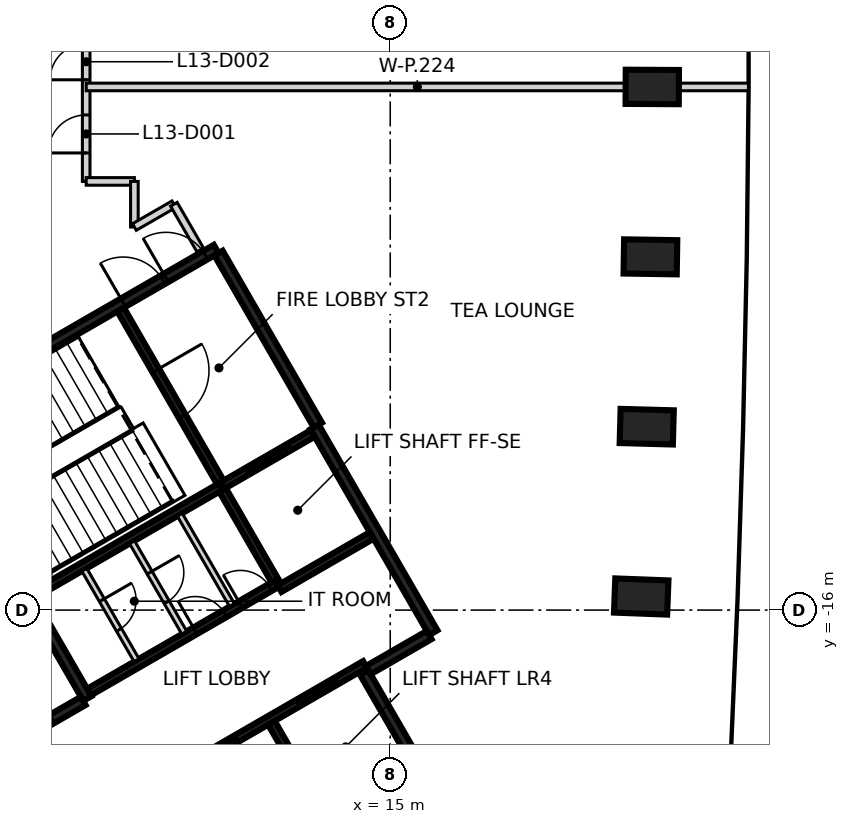
"""IFC4 building model, lengths in metres.
Left out: names, types, materials, properties, quantities, classifications, styles, units other than length and angle.
Written with IfcOpenShell. Run it as: python <this file> out.ifc"""

import sys

from ifc_helpers import new_model, si_unit, direction, frame, frame_2d, origin, origin_2d, place, context, subcontext, project, spatial, rectangle, extrude, element, fill, save


model = new_model("IFC4")
c1 = context("Model", 3, precision=1e-05, world=origin(), true_north=direction((0.0, 1.0)))
c2 = subcontext(c1, "Body", "Model", "MODEL_VIEW")
j1 = project(units=[si_unit("LENGTHUNIT", "METRE"), si_unit("PLANEANGLEUNIT", "RADIAN")], contexts=[c1])
p1 = place(None, origin())
s1 = spatial("IfcSite", under=j1, at=p1, CompositionType="ELEMENT")
p2 = place(p1, origin())
s2 = spatial("IfcBuilding", under=s1, at=p2, CompositionType="ELEMENT")
p3 = place(p2, frame((0.0, 0.0, 60.2)))
s3 = spatial("IfcBuildingStorey", under=s2, at=p3, CompositionType="ELEMENT", Elevation=60.2)
for number, where, z_axis, x_axis in (
    (1, (21.604, -15.643, -0.475), (0.0, 0.0, 1.0), (-0.999, 0.038, 0.0)),
    (2, (21.749, -11.174, -0.475), (0.0, 0.0, 1.0), (-1.0, 0.027, 0.0)),
    (3, (21.846, -6.706, -0.475), (0.0, 0.0, 1.0), (-1.0, 0.016, 0.0)),
    (4, (21.894, -2.235, -0.475), (0.0, 0.0, 1.0), (-1.0, 0.005, 0.0)),
):
    element("IfcColumn", number, at=place(p3, frame(where, z_axis=z_axis, x_axis=x_axis)), inside=s3, PredefinedType="COLUMN", context=c2, shape_type="SweptSolid", body=[
        extrude(rectangle(XDim=1.4, YDim=0.9, at=origin_2d()), origin(), (0.0, 0.0, 1.0), 3.6),
    ])
p4 = place(p3, frame((0.417, -12.273, 0.0), z_axis=(0.0, 0.0, 1.0), x_axis=(0.866021906294, 0.500006057782, 0.0)))
e5 = element("IfcWall", 5, at=p4, inside=s3, PredefinedType="SHEAR", context=c2, shape_type="SweptSolid", body=[
    extrude(rectangle(XDim=11.55, YDim=0.25, at=frame_2d((5.775, 0.0))), origin(), (0.0, 0.0, 1.0), 3.125),
])
p5 = place(p4, frame((10.025, 0.0, 0.0)))
e6 = element("IfcOpeningElement", 6, at=p5, cuts=e5, PredefinedType="OPENING", context=c2, shape_type="SweptSolid", body=[
    extrude(rectangle(XDim=1.2, YDim=2.1, at=frame_2d((0.6, 1.05))), frame((0.0, 0.135, 0.0), z_axis=(0.0, -1.0, 0.0), x_axis=(1.0, 0.0, 0.0)), (0.0, 0.0, 1.0), 0.27),
])
p6 = place(p4, frame((8.725, 0.0, 0.0)))
e7 = element("IfcOpeningElement", 7, at=p6, cuts=e5, PredefinedType="OPENING", context=c2, shape_type="SweptSolid", body=[
    extrude(rectangle(XDim=1.2, YDim=2.1, at=frame_2d((0.6, 1.05))), frame((0.0, 0.135, 0.0), z_axis=(0.0, -1.0, 0.0), x_axis=(1.0, 0.0, 0.0)), (0.0, 0.0, 1.0), 0.27),
])
p7 = place(p3, frame((13.008, -11.181, 0.0), z_axis=(0.0, 0.0, 1.0), x_axis=(0.500004234368, -0.866022959057, 0.0)))
e8 = element("IfcWall", 8, at=p7, inside=s3, PredefinedType="SHEAR", context=c2, shape_type="SweptSolid", body=[
    extrude(rectangle(XDim=6.25, YDim=0.25, at=frame_2d((3.125, 0.0))), origin(), (0.0, 0.0, 1.0), 3.125),
])
p8 = place(p3, frame((10.483, -6.606, 0.0), z_axis=(0.0, 0.0, 1.0), x_axis=(0.49999885962, -0.866026062182, 0.0)))
e9 = element("IfcWall", 9, at=p8, inside=s3, PredefinedType="SHEAR", context=c2, shape_type="SweptSolid", body=[
    extrude(rectangle(XDim=5.225, YDim=0.25, at=frame_2d((2.612, 0.0))), origin(), (0.0, 0.0, 1.0), 3.125),
])
p9 = place(p3, frame((7.031, -18.327, 0.0), z_axis=(0.0, 0.0, 1.0), x_axis=(-0.499971222258, 0.866042017984, 0.0)))
e10 = element("IfcWall", 10, at=p9, inside=s3, PredefinedType="SHEAR", context=c2, shape_type="SweptSolid", body=[
    extrude(rectangle(XDim=3.2, YDim=0.25, at=frame_2d((1.6, 0.0))), origin(), (0.0, 0.0, 1.0), 3.125),
])
p10 = place(p3, frame((14.315, -17.644, 0.0), z_axis=(0.0, 0.0, 1.0), x_axis=(0.500023226632, -0.866011993467, 0.0)))
e11 = element("IfcWall", 11, at=p10, inside=s3, PredefinedType="SHEAR", context=c2, shape_type="SweptSolid", body=[
    extrude(rectangle(XDim=2.974, YDim=0.25, at=frame_2d((1.487, 0.0))), origin(), (0.0, 0.0, 1.0), 3.125),
])
p11 = place(p3, frame((16.025, -16.656, 0.0), z_axis=(0.0, 0.0, 1.0), x_axis=(-0.866016279763, -0.500015802937, 0.0)))
e12 = element("IfcWall", 12, at=p11, inside=s3, PredefinedType="SHEAR", context=c2, shape_type="SweptSolid", body=[
    extrude(rectangle(XDim=1.849, YDim=0.25, at=frame_2d((0.925, 0.0))), origin(), (0.0, 0.0, 1.0), 3.125),
])
p12 = place(p3, frame((6.065, -18.885, 0.0), z_axis=(0.0, 0.0, 1.0), x_axis=(0.866017078145, 0.500014420154, 0.0)))
e13 = element("IfcWall", 13, at=p12, inside=s3, PredefinedType="SHEAR", context=c2, shape_type="SweptSolid", body=[
    extrude(rectangle(XDim=0.989, YDim=0.25, at=frame_2d((0.495, 0.0))), origin(), (0.0, 0.0, 1.0), 3.125),
])
p13 = place(p3, frame((6.08, -20.1, 0.0), z_axis=(0.0, 0.0, 1.0), x_axis=(-0.500051773299, 0.865995510393, 0.0)))
e14 = element("IfcWall", 14, at=p13, inside=s3, PredefinedType="SHEAR", context=c2, shape_type="SweptSolid", body=[
    extrude(rectangle(XDim=0.685, YDim=0.25, at=frame_2d((0.342, 0.0))), origin(), (0.0, 0.0, 1.0), 3.125),
])
p14 = place(p3, frame((9.052, -20.48, 0.0), z_axis=(0.0, 0.0, 1.0), x_axis=(0.866030299012, 0.499991521122, 0.0)))
e15 = element("IfcWall", 15, at=p14, inside=s3, PredefinedType="SHEAR", context=c2, shape_type="SweptSolid", body=[
    extrude(rectangle(XDim=6.1, YDim=0.2, at=frame_2d((3.05, 0.0))), origin(), (0.0, 0.0, 1.0), 3.125),
])
p15 = place(p14, frame((1.0, 0.0, 0.0)))
e16 = element("IfcOpeningElement", 16, at=p15, cuts=e15, PredefinedType="OPENING", context=c2, shape_type="SweptSolid", body=[
    extrude(rectangle(XDim=1.2, YDim=2.1, at=frame_2d((0.6, 1.05))), frame((0.0, 0.11, 0.0), z_axis=(0.0, -1.0, 0.0), x_axis=(1.0, 0.0, 0.0)), (0.0, 0.0, 1.0), 0.22),
])
p16 = place(p14, frame((4.05, 0.0, 0.0)))
e17 = element("IfcOpeningElement", 17, at=p16, cuts=e15, PredefinedType="OPENING", context=c2, shape_type="SweptSolid", body=[
    extrude(rectangle(XDim=1.2, YDim=2.1, at=frame_2d((0.6, 1.05))), frame((0.0, 0.11, 0.0), z_axis=(0.0, -1.0, 0.0), x_axis=(1.0, 0.0, 0.0)), (0.0, 0.0, 1.0), 0.22),
])
p17 = place(p3, frame((10.538, -12.752, 0.0), z_axis=(0.0, 0.0, 1.0), x_axis=(-0.866038630372, -0.499977090179, 0.0)))
e18 = element("IfcWall", 18, at=p17, inside=s3, PredefinedType="SHEAR", context=c2, shape_type="SweptSolid", body=[
    extrude(rectangle(XDim=5.699, YDim=0.2, at=frame_2d((2.85, 0.0))), origin(), (0.0, 0.0, 1.0), 3.125),
])
p18 = place(p3, frame((7.077, -18.156, 0.0), z_axis=(0.0, 0.0, 1.0), x_axis=(0.866038630372, 0.499977090179, 0.0)))
e19 = element("IfcWall", 19, at=p18, inside=s3, PredefinedType="SHEAR", context=c2, shape_type="SweptSolid", body=[
    extrude(rectangle(XDim=5.699, YDim=0.2, at=frame_2d((2.85, 0.0))), origin(), (0.0, 0.0, 1.0), 3.125),
])
p19 = place(p18, frame((3.224, 0.0, 0.0)))
e20 = element("IfcOpeningElement", 20, at=p19, cuts=e19, PredefinedType="OPENING", context=c2, shape_type="SweptSolid", body=[
    extrude(rectangle(XDim=0.9, YDim=2.1, at=frame_2d((0.45, 1.05))), frame((0.0, 0.11, 0.0), z_axis=(0.0, -1.0, 0.0), x_axis=(1.0, 0.0, 0.0)), (0.0, 0.0, 1.0), 0.22),
])
p20 = place(p18, frame((4.599, 0.0, 0.0)))
e21 = element("IfcOpeningElement", 21, at=p20, cuts=e19, PredefinedType="OPENING", context=c2, shape_type="SweptSolid", body=[
    extrude(rectangle(XDim=0.9, YDim=2.1, at=frame_2d((0.45, 1.05))), frame((0.0, 0.11, 0.0), z_axis=(0.0, -1.0, 0.0), x_axis=(1.0, 0.0, 0.0)), (0.0, 0.0, 1.0), 0.22),
])
p21 = place(p3, frame((7.906, -8.094, 0.0), z_axis=(0.0, 0.0, 1.0), x_axis=(0.500024287448, -0.866011380966, 0.0)))
e22 = element("IfcWall", 22, at=p21, inside=s3, PredefinedType="SHEAR", context=c2, shape_type="SweptSolid", body=[
    extrude(rectangle(XDim=5.251, YDim=0.2, at=frame_2d((2.625, 0.0))), origin(), (0.0, 0.0, 1.0), 3.125),
])
p22 = place(p21, frame((1.849, 0.0, 0.0)))
e23 = element("IfcOpeningElement", 23, at=p22, cuts=e22, PredefinedType="OPENING", context=c2, shape_type="SweptSolid", body=[
    extrude(rectangle(XDim=1.4, YDim=2.1, at=frame_2d((0.7, 1.05))), frame((0.0, 0.11, 0.0), z_axis=(0.0, -1.0, 0.0), x_axis=(1.0, 0.0, 0.0)), (0.0, 0.0, 1.0), 0.22),
])
p23 = place(p3, frame((11.875, -18.967, 0.0), z_axis=(0.0, 0.0, 1.0), x_axis=(0.49998131003, -0.866036194175, 0.0)))
e24 = element("IfcWall", 24, at=p23, inside=s3, PredefinedType="SHEAR", context=c2, shape_type="SweptSolid", body=[
    extrude(rectangle(XDim=3.048, YDim=0.2, at=frame_2d((1.524, 0.0))), origin(), (0.0, 0.0, 1.0), 3.125),
])
p24 = place(p3, frame((11.963, -15.22, 0.0), z_axis=(0.0, 0.0, 1.0), x_axis=(-0.500034990121, 0.866005201286, 0.0)))
e25 = element("IfcWall", 25, at=p24, inside=s3, PredefinedType="SHEAR", context=c2, shape_type="SweptSolid", body=[
    extrude(rectangle(XDim=2.75, YDim=0.2, at=frame_2d((1.375, 0.0))), origin(), (0.0, 0.0, 1.0), 3.125),
])
p25 = place(p3, frame((10.587, -12.723, 0.0), z_axis=(0.0, 0.0, 1.0), x_axis=(0.866037306777, 0.499979382845, 0.0)))
e26 = element("IfcWall", 26, at=p25, inside=s3, PredefinedType="SHEAR", context=c2, shape_type="SweptSolid", body=[
    extrude(rectangle(XDim=2.742, YDim=0.2, at=frame_2d((1.371, 0.0))), origin(), (0.0, 0.0, 1.0), 3.125),
])
p26 = place(p25, frame((0.743, 0.0, 0.0)))
e27 = element("IfcOpeningElement", 27, at=p26, cuts=e26, PredefinedType="OPENING", context=c2, shape_type="SweptSolid", body=[
    extrude(rectangle(XDim=1.3, YDim=2.1, at=frame_2d((0.65, 1.05))), frame((0.0, 0.11, 0.0), z_axis=(0.0, -1.0, 0.0), x_axis=(1.0, 0.0, 0.0)), (0.0, 0.0, 1.0), 0.22),
])
p27 = place(p3, frame((14.512, -14.037, 0.0), z_axis=(0.0, 0.0, 1.0), x_axis=(-0.866044696403, -0.499966582715, 0.0)))
e28 = element("IfcWall", 28, at=p27, inside=s3, PredefinedType="SHEAR", context=c2, shape_type="SweptSolid", body=[
    extrude(rectangle(XDim=2.799, YDim=0.2, at=frame_2d((1.399, 0.0))), origin(), (0.0, 0.0, 1.0), 3.125),
])
p28 = place(p3, frame((8.207, -14.214, 0.0), z_axis=(0.0, 0.0, 1.0), x_axis=(0.50002746344, -0.86600954718, 0.0)))
e29 = element("IfcWall", 29, at=p28, inside=s3, PredefinedType="PARTITIONING", context=c2, shape_type="SweptSolid", body=[
    extrude(rectangle(XDim=2.748, YDim=0.15, at=frame_2d((1.374, 0.0))), origin(), (0.0, 0.0, 1.0), 3.125),
])
p29 = place(p28, frame((0.924, 0.0, 0.0)))
e30 = element("IfcOpeningElement", 30, at=p29, cuts=e29, PredefinedType="OPENING", context=c2, shape_type="SweptSolid", body=[
    extrude(rectangle(XDim=0.9, YDim=2.1, at=frame_2d((0.45, 1.05))), frame((0.0, 0.085, 0.0), z_axis=(0.0, -1.0, 0.0), x_axis=(1.0, 0.0, 0.0)), (0.0, 0.0, 1.0), 0.17),
])
p30 = place(p3, frame((9.462, -13.489, 0.0), z_axis=(0.0, 0.0, 1.0), x_axis=(0.499988999718, -0.866031754707, 0.0)))
e31 = element("IfcWall", 31, at=p30, inside=s3, PredefinedType="PARTITIONING", context=c2, shape_type="SweptSolid", body=[
    extrude(rectangle(XDim=2.749, YDim=0.15, at=frame_2d((1.374, 0.0))), origin(), (0.0, 0.0, 1.0), 3.125),
])
p31 = place(p3, frame((6.951, -14.939, 0.0), z_axis=(0.0, 0.0, 1.0), x_axis=(0.499988999718, -0.866031754707, 0.0)))
e32 = element("IfcWall", 32, at=p31, inside=s3, PredefinedType="PARTITIONING", context=c2, shape_type="SweptSolid", body=[
    extrude(rectangle(XDim=2.749, YDim=0.15, at=frame_2d((1.374, 0.0))), origin(), (0.0, 0.0, 1.0), 3.125),
])
p32 = place(p31, frame((0.924, 0.0, 0.0)))
e33 = element("IfcOpeningElement", 33, at=p32, cuts=e32, PredefinedType="OPENING", context=c2, shape_type="SweptSolid", body=[
    extrude(rectangle(XDim=0.9, YDim=2.1, at=frame_2d((0.45, 1.05))), frame((0.0, 0.085, 0.0), z_axis=(0.0, -1.0, 0.0), x_axis=(1.0, 0.0, 0.0)), (0.0, 0.0, 1.0), 0.17),
])
p33 = place(p3, frame((7.0, -4.721, 0.0), z_axis=(0.0, 0.0, 1.0), x_axis=(0.0, 1.0, 0.0)))
e34 = element("IfcWall", 34, at=p33, inside=s3, PredefinedType="PARTITIONING", context=c2, shape_type="SweptSolid", body=[
    extrude(rectangle(XDim=8.799, YDim=0.2, at=frame_2d((4.399, 0.0))), origin(), (0.0, 0.0, 1.0), 3.125),
])
p34 = place(p33, frame((0.749, 0.0, 0.0)))
e35 = element("IfcOpeningElement", 35, at=p34, cuts=e34, PredefinedType="OPENING", context=c2, shape_type="SweptSolid", body=[
    extrude(rectangle(XDim=1.0, YDim=2.1, at=frame_2d((0.5, 1.05))), frame((0.0, 0.11, 0.0), z_axis=(0.0, -1.0, 0.0), x_axis=(1.0, 0.0, 0.0)), (0.0, 0.0, 1.0), 0.22),
])
p35 = place(p33, frame((2.674, 0.0, 0.0)))
e36 = element("IfcOpeningElement", 36, at=p35, cuts=e34, PredefinedType="OPENING", context=c2, shape_type="SweptSolid", body=[
    extrude(rectangle(XDim=0.95, YDim=2.1, at=frame_2d((0.475, 1.05))), frame((0.0, 0.11, 0.0), z_axis=(0.0, -1.0, 0.0), x_axis=(1.0, 0.0, 0.0)), (0.0, 0.0, 1.0), 0.22),
])
p36 = place(p3, frame((7.0, -4.721, 0.0), z_axis=(0.0, 0.0, 1.0), x_axis=(1.0, 0.0, 0.0)))
e37 = element("IfcWall", 37, at=p36, inside=s3, PredefinedType="PARTITIONING", context=c2, shape_type="SweptSolid", body=[
    extrude(rectangle(XDim=1.268, YDim=0.2, at=frame_2d((0.634, 0.0))), origin(), (0.0, 0.0, 1.0), 3.125),
])
p37 = place(p3, frame((8.268, -5.921, 0.0), z_axis=(0.0, 0.0, 1.0), x_axis=(0.0, 1.0, 0.0)))
e38 = element("IfcWall", 38, at=p37, inside=s3, PredefinedType="PARTITIONING", context=c2, shape_type="SweptSolid", body=[
    extrude(rectangle(XDim=1.2, YDim=0.2, at=frame_2d((0.6, 0.0))), origin(), (0.0, 0.0, 1.0), 3.125),
])
p38 = place(p3, frame((8.268, -5.921, 0.0), z_axis=(0.0, 0.0, 1.0), x_axis=(0.866344856625, 0.499446282797, 0.0)))
e39 = element("IfcWall", 39, at=p38, inside=s3, PredefinedType="PARTITIONING", context=c2, shape_type="SweptSolid", body=[
    extrude(rectangle(XDim=1.199, YDim=0.2, at=frame_2d((0.6, 0.0))), origin(), (0.0, 0.0, 1.0), 3.125),
])
p39 = place(p3, frame((9.307, -5.322, 0.0), z_axis=(0.0, 0.0, 1.0), x_axis=(0.500295157811, -0.865854927266, 0.0)))
e40 = element("IfcWall", 40, at=p39, inside=s3, PredefinedType="PARTITIONING", context=c2, shape_type="SweptSolid", body=[
    extrude(rectangle(XDim=1.39, YDim=0.2, at=frame_2d((0.695, 0.0))), origin(), (0.0, 0.0, 1.0), 3.125),
])
p40 = place(p3, frame((7.001, -2.235, 0.0), z_axis=(0.0, 0.0, 1.0), x_axis=(1.0, 0.0, 0.0)))
e41 = element("IfcWall", 41, at=p40, inside=s3, PredefinedType="PARTITIONING", context=c2, shape_type="SweptSolid", body=[
    extrude(rectangle(XDim=17.424, YDim=0.2, at=frame_2d((8.712, 0.0))), origin(), (0.0, 0.0, 1.0), 3.125),
])
p41 = place(p26, origin())
e42 = element("IfcDoor", 42, at=p41, inside=s3, OperationType="SLIDING_TO_RIGHT", PredefinedType="DOOR", context=c2, shape_type="SweptSolid", body=[
    extrude(rectangle(XDim=1.3, YDim=2.1, at=frame_2d((0.65, 1.05))), frame((0.0, 0.025, 0.0), z_axis=(0.0, -1.0, 0.0), x_axis=(1.0, 0.0, 0.0)), (0.0, 0.0, 1.0), 0.05),
])
fill(e27, e42)
p42 = place(p15, origin())
e43 = element("IfcDoor", 43, at=p42, inside=s3, OperationType="DOUBLE_DOOR_SLIDING", PredefinedType="DOOR", context=c2, shape_type="SweptSolid", body=[
    extrude(rectangle(XDim=1.2, YDim=2.1, at=frame_2d((0.6, 1.05))), frame((0.0, 0.025, 0.0), z_axis=(0.0, -1.0, 0.0), x_axis=(1.0, 0.0, 0.0)), (0.0, 0.0, 1.0), 0.05),
])
fill(e16, e43)
p43 = place(p16, origin())
e44 = element("IfcDoor", 44, at=p43, inside=s3, OperationType="DOUBLE_DOOR_SLIDING", PredefinedType="DOOR", context=c2, shape_type="SweptSolid", body=[
    extrude(rectangle(XDim=1.2, YDim=2.1, at=frame_2d((0.6, 1.05))), frame((0.0, 0.025, 0.0), z_axis=(0.0, -1.0, 0.0), x_axis=(1.0, 0.0, 0.0)), (0.0, 0.0, 1.0), 0.05),
])
fill(e17, e44)
p44 = place(p5, origin())
e45 = element("IfcDoor", 45, at=p44, inside=s3, OperationType="SINGLE_SWING_LEFT", PredefinedType="DOOR", context=c2, shape_type="SweptSolid", body=[
    extrude(rectangle(XDim=1.2, YDim=2.1, at=frame_2d((0.6, 1.05))), frame((0.0, 0.025, 0.0), z_axis=(0.0, -1.0, 0.0), x_axis=(1.0, 0.0, 0.0)), (0.0, 0.0, 1.0), 0.05),
])
fill(e6, e45)
p45 = place(p6, origin())
e46 = element("IfcDoor", 46, at=p45, inside=s3, OperationType="SINGLE_SWING_RIGHT", PredefinedType="DOOR", context=c2, shape_type="SweptSolid", body=[
    extrude(rectangle(XDim=1.2, YDim=2.1, at=frame_2d((0.6, 1.05))), frame((0.0, 0.025, 0.0), z_axis=(0.0, -1.0, 0.0), x_axis=(1.0, 0.0, 0.0)), (0.0, 0.0, 1.0), 0.05),
])
fill(e7, e46)
p46 = place(p22, origin())
e47 = element("IfcDoor", 47, at=p46, inside=s3, OperationType="SINGLE_SWING_RIGHT", PredefinedType="DOOR", context=c2, shape_type="SweptSolid", body=[
    extrude(rectangle(XDim=1.4, YDim=2.1, at=frame_2d((0.7, 1.05))), frame((0.0, 0.025, 0.0), z_axis=(0.0, -1.0, 0.0), x_axis=(1.0, 0.0, 0.0)), (0.0, 0.0, 1.0), 0.05),
])
fill(e23, e47)
p47 = place(p19, origin())
e48 = element("IfcDoor", 48, at=p47, inside=s3, OperationType="SINGLE_SWING_LEFT", PredefinedType="DOOR", context=c2, shape_type="SweptSolid", body=[
    extrude(rectangle(XDim=0.9, YDim=2.1, at=frame_2d((0.45, 1.05))), frame((0.0, 0.025, 0.0), z_axis=(0.0, -1.0, 0.0), x_axis=(1.0, 0.0, 0.0)), (0.0, 0.0, 1.0), 0.05),
])
fill(e20, e48)
p48 = place(p20, origin())
e49 = element("IfcDoor", 49, at=p48, inside=s3, OperationType="SINGLE_SWING_RIGHT", PredefinedType="DOOR", context=c2, shape_type="SweptSolid", body=[
    extrude(rectangle(XDim=0.9, YDim=2.1, at=frame_2d((0.45, 1.05))), frame((0.0, 0.025, 0.0), z_axis=(0.0, -1.0, 0.0), x_axis=(1.0, 0.0, 0.0)), (0.0, 0.0, 1.0), 0.05),
])
fill(e21, e49)
p49 = place(p29, origin())
e50 = element("IfcDoor", 50, at=p49, inside=s3, OperationType="SINGLE_SWING_RIGHT", PredefinedType="DOOR", context=c2, shape_type="SweptSolid", body=[
    extrude(rectangle(XDim=0.9, YDim=2.1, at=frame_2d((0.45, 1.05))), frame((0.0, 0.025, 0.0), z_axis=(0.0, -1.0, 0.0), x_axis=(1.0, 0.0, 0.0)), (0.0, 0.0, 1.0), 0.05),
])
fill(e30, e50)
p50 = place(p32, origin())
e51 = element("IfcDoor", 51, at=p50, inside=s3, OperationType="SINGLE_SWING_LEFT", PredefinedType="DOOR", context=c2, shape_type="SweptSolid", body=[
    extrude(rectangle(XDim=0.9, YDim=2.1, at=frame_2d((0.45, 1.05))), frame((0.0, 0.025, 0.0), z_axis=(0.0, -1.0, 0.0), x_axis=(1.0, 0.0, 0.0)), (0.0, 0.0, 1.0), 0.05),
])
fill(e33, e51)
p51 = place(p34, frame((1.0, 0.0, 0.0), z_axis=(0.0, 0.0, 1.0), x_axis=(-1.0, 0.0, 0.0)))
e52 = element("IfcDoor", 52, at=p51, inside=s3, OperationType="SINGLE_SWING_LEFT", PredefinedType="DOOR", context=c2, shape_type="SweptSolid", body=[
    extrude(rectangle(XDim=1.0, YDim=2.1, at=frame_2d((0.5, 1.05))), frame((0.0, 0.025, 0.0), z_axis=(0.0, -1.0, 0.0), x_axis=(1.0, 0.0, 0.0)), (0.0, 0.0, 1.0), 0.05),
])
fill(e35, e52)
p52 = place(p35, frame((0.95, 0.0, 0.0), z_axis=(0.0, 0.0, 1.0), x_axis=(-1.0, 0.0, 0.0)))
e53 = element("IfcDoor", 53, at=p52, inside=s3, OperationType="SINGLE_SWING_LEFT", PredefinedType="DOOR", context=c2, shape_type="SweptSolid", body=[
    extrude(rectangle(XDim=0.95, YDim=2.1, at=frame_2d((0.475, 1.05))), frame((0.0, 0.025, 0.0), z_axis=(0.0, -1.0, 0.0), x_axis=(1.0, 0.0, 0.0)), (0.0, 0.0, 1.0), 0.05),
])
fill(e36, e53)
save(model, sys.argv[1])
